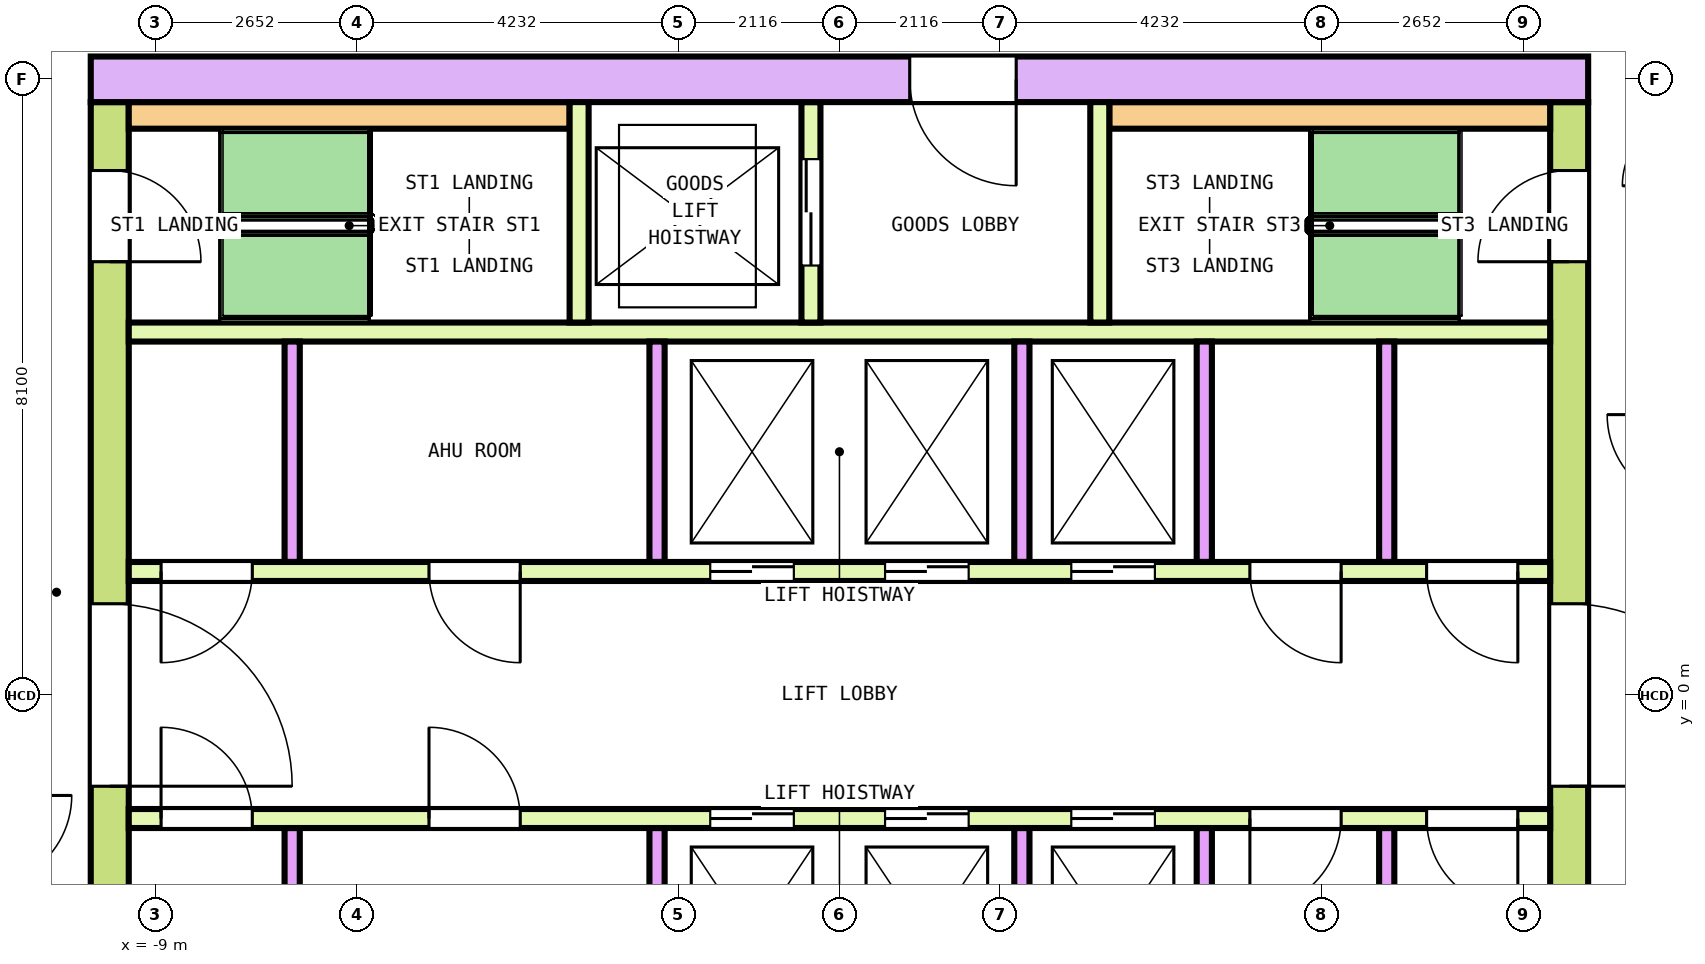
"""IFC4 building model, lengths in metres.
Left out: names, types, materials, properties, quantities, classifications, styles, units other than length and angle.
Written with IfcOpenShell. Run it as: python <this file> out.ifc"""

import sys

from ifc_helpers import new_model, si_unit, direction, frame, frame_2d, origin, place, context, subcontext, project, spatial, rectangle, extrude, element, fill, save


model = new_model("IFC4")
c1 = context("Model", 3, precision=1e-05, world=origin(), true_north=direction((0.0, 1.0)))
c2 = subcontext(c1, "Body", "Model", "MODEL_VIEW")
j1 = project(units=[si_unit("LENGTHUNIT", "METRE"), si_unit("PLANEANGLEUNIT", "RADIAN")], contexts=[c1])
p1 = place(None, origin())
s1 = spatial("IfcSite", under=j1, at=p1, CompositionType="ELEMENT")
p2 = place(p1, origin())
s2 = spatial("IfcBuilding", under=s1, at=p2, CompositionType="ELEMENT")
p3 = place(p2, frame((0.0, 0.0, 257.4)))
s3 = spatial("IfcBuildingStorey", under=s2, at=p3, CompositionType="ELEMENT", Elevation=257.4)
p4 = place(p3, frame((-9.85, 8.1, 0.0), z_axis=(0.0, 0.0, 1.0), x_axis=(1.0, 0.0, 0.0)))
e1 = element("IfcWall", 1, at=p4, inside=s3, PredefinedType="SHEAR", context=c2, shape_type="SweptSolid", body=[
    extrude(rectangle(XDim=19.7, YDim=0.6, at=frame_2d((9.85, 0.0))), origin(), (0.0, 0.0, 1.0), 5.3),
])
p5 = place(p4, frame((10.775, 0.0, 0.0)))
e2 = element("IfcOpeningElement", 2, at=p5, cuts=e1, PredefinedType="OPENING", context=c2, shape_type="SweptSolid", body=[
    extrude(rectangle(XDim=1.4, YDim=2.1, at=frame_2d((0.7, 1.05))), frame((0.0, 0.31, 0.0), z_axis=(0.0, -1.0, 0.0), x_axis=(1.0, 0.0, 0.0)), (0.0, 0.0, 1.0), 0.62),
])
p6 = place(p3, frame((-9.6, -7.8, 0.0), z_axis=(0.0, 0.0, 1.0), x_axis=(0.0, 1.0, 0.0)))
e3 = element("IfcWall", 3, at=p6, inside=s3, PredefinedType="SHEAR", context=c2, shape_type="SweptSolid", body=[
    extrude(rectangle(XDim=15.6, YDim=0.5, at=frame_2d((7.8, 0.0))), origin(), (0.0, 0.0, 1.0), 5.3),
])
p7 = place(p6, frame((6.6, 0.0, 0.0)))
e4 = element("IfcOpeningElement", 4, at=p7, cuts=e3, PredefinedType="OPENING", context=c2, shape_type="SweptSolid", body=[
    extrude(rectangle(XDim=2.4, YDim=2.1, at=frame_2d((1.2, 1.05))), frame((0.0, 0.26, 0.0), z_axis=(0.0, -1.0, 0.0), x_axis=(1.0, 0.0, 0.0)), (0.0, 0.0, 1.0), 0.52),
])
p8 = place(p6, frame((13.5, 0.0, 0.0)))
e5 = element("IfcOpeningElement", 5, at=p8, cuts=e3, PredefinedType="OPENING", context=c2, shape_type="SweptSolid", body=[
    extrude(rectangle(XDim=1.2, YDim=2.1, at=frame_2d((0.6, 1.05))), frame((0.0, 0.26, 0.0), z_axis=(0.0, -1.0, 0.0), x_axis=(1.0, 0.0, 0.0)), (0.0, 0.0, 1.0), 0.52),
])
p9 = place(p6, frame((0.9, 0.0, 0.0)))
e6 = element("IfcOpeningElement", 6, at=p9, cuts=e3, PredefinedType="OPENING", context=c2, shape_type="SweptSolid", body=[
    extrude(rectangle(XDim=1.2, YDim=2.1, at=frame_2d((0.6, 1.05))), frame((0.0, 0.26, 0.0), z_axis=(0.0, -1.0, 0.0), x_axis=(1.0, 0.0, 0.0)), (0.0, 0.0, 1.0), 0.52),
])
p10 = place(p3, frame((9.6, -7.8, 0.0), z_axis=(0.0, 0.0, 1.0), x_axis=(0.0, 1.0, 0.0)))
e7 = element("IfcWall", 7, at=p10, inside=s3, PredefinedType="SHEAR", context=c2, shape_type="SweptSolid", body=[
    extrude(rectangle(XDim=15.6, YDim=0.5, at=frame_2d((7.8, 0.0))), origin(), (0.0, 0.0, 1.0), 5.3),
])
p11 = place(p10, frame((6.6, 0.0, 0.0)))
e8 = element("IfcOpeningElement", 8, at=p11, cuts=e7, PredefinedType="OPENING", context=c2, shape_type="SweptSolid", body=[
    extrude(rectangle(XDim=2.4, YDim=2.1, at=frame_2d((1.2, 1.05))), frame((0.0, 0.26, 0.0), z_axis=(0.0, -1.0, 0.0), x_axis=(1.0, 0.0, 0.0)), (0.0, 0.0, 1.0), 0.52),
])
p12 = place(p10, frame((13.5, 0.0, 0.0)))
e9 = element("IfcOpeningElement", 9, at=p12, cuts=e7, PredefinedType="OPENING", context=c2, shape_type="SweptSolid", body=[
    extrude(rectangle(XDim=1.2, YDim=2.1, at=frame_2d((0.6, 1.05))), frame((0.0, 0.26, 0.0), z_axis=(0.0, -1.0, 0.0), x_axis=(1.0, 0.0, 0.0)), (0.0, 0.0, 1.0), 0.52),
])
p13 = place(p10, frame((1.0, 0.0, 0.0)))
e10 = element("IfcOpeningElement", 10, at=p13, cuts=e7, PredefinedType="OPENING", context=c2, shape_type="SweptSolid", body=[
    extrude(rectangle(XDim=1.0, YDim=2.1, at=frame_2d((0.5, 1.05))), frame((0.0, 0.26, 0.0), z_axis=(0.0, -1.0, 0.0), x_axis=(1.0, 0.0, 0.0)), (0.0, 0.0, 1.0), 0.52),
])
p14 = place(p3, frame((-9.35, 1.625, 0.0), z_axis=(0.0, 0.0, 1.0), x_axis=(1.0, 0.0, 0.0)))
e11 = element("IfcWall", 11, at=p14, inside=s3, PredefinedType="SOLIDWALL", context=c2, shape_type="SweptSolid", body=[
    extrude(rectangle(XDim=18.7, YDim=0.25, at=frame_2d((9.35, 0.0))), origin(), (0.0, 0.0, 1.0), 5.3),
])
p15 = place(p14, frame((7.65, 0.0, 0.0)))
e12 = element("IfcOpeningElement", 12, at=p15, cuts=e11, PredefinedType="OPENING", context=c2, shape_type="SweptSolid", body=[
    extrude(rectangle(XDim=1.1, YDim=2.1, at=frame_2d((0.55, 1.05))), frame((0.0, 0.135, 0.0), z_axis=(0.0, -1.0, 0.0), x_axis=(1.0, 0.0, 0.0)), (0.0, 0.0, 1.0), 0.27),
])
p16 = place(p14, frame((9.95, 0.0, 0.0)))
e13 = element("IfcOpeningElement", 13, at=p16, cuts=e11, PredefinedType="OPENING", context=c2, shape_type="SweptSolid", body=[
    extrude(rectangle(XDim=1.1, YDim=2.1, at=frame_2d((0.55, 1.05))), frame((0.0, 0.135, 0.0), z_axis=(0.0, -1.0, 0.0), x_axis=(1.0, 0.0, 0.0)), (0.0, 0.0, 1.0), 0.27),
])
p17 = place(p14, frame((12.4, 0.0, 0.0)))
e14 = element("IfcOpeningElement", 14, at=p17, cuts=e11, PredefinedType="OPENING", context=c2, shape_type="SweptSolid", body=[
    extrude(rectangle(XDim=1.1, YDim=2.1, at=frame_2d((0.55, 1.05))), frame((0.0, 0.135, 0.0), z_axis=(0.0, -1.0, 0.0), x_axis=(1.0, 0.0, 0.0)), (0.0, 0.0, 1.0), 0.27),
])
p18 = place(p14, frame((0.425, 0.0, 0.0)))
e15 = element("IfcOpeningElement", 15, at=p18, cuts=e11, PredefinedType="OPENING", context=c2, shape_type="SweptSolid", body=[
    extrude(rectangle(XDim=1.2, YDim=2.1, at=frame_2d((0.6, 1.05))), frame((0.0, 0.135, 0.0), z_axis=(0.0, -1.0, 0.0), x_axis=(1.0, 0.0, 0.0)), (0.0, 0.0, 1.0), 0.27),
])
p19 = place(p14, frame((3.95, 0.0, 0.0)))
e16 = element("IfcOpeningElement", 16, at=p19, cuts=e11, PredefinedType="OPENING", context=c2, shape_type="SweptSolid", body=[
    extrude(rectangle(XDim=1.2, YDim=2.1, at=frame_2d((0.6, 1.05))), frame((0.0, 0.135, 0.0), z_axis=(0.0, -1.0, 0.0), x_axis=(1.0, 0.0, 0.0)), (0.0, 0.0, 1.0), 0.27),
])
p20 = place(p14, frame((14.75, 0.0, 0.0)))
e17 = element("IfcOpeningElement", 17, at=p20, cuts=e11, PredefinedType="OPENING", context=c2, shape_type="SweptSolid", body=[
    extrude(rectangle(XDim=1.2, YDim=2.1, at=frame_2d((0.6, 1.05))), frame((0.0, 0.135, 0.0), z_axis=(0.0, -1.0, 0.0), x_axis=(1.0, 0.0, 0.0)), (0.0, 0.0, 1.0), 0.27),
])
p21 = place(p14, frame((17.075, 0.0, 0.0)))
e18 = element("IfcOpeningElement", 18, at=p21, cuts=e11, PredefinedType="OPENING", context=c2, shape_type="SweptSolid", body=[
    extrude(rectangle(XDim=1.2, YDim=2.1, at=frame_2d((0.6, 1.05))), frame((0.0, 0.135, 0.0), z_axis=(0.0, -1.0, 0.0), x_axis=(1.0, 0.0, 0.0)), (0.0, 0.0, 1.0), 0.27),
])
p22 = place(p3, frame((-9.35, 4.775, 0.0), z_axis=(0.0, 0.0, 1.0), x_axis=(1.0, 0.0, 0.0)))
e19 = element("IfcWall", 19, at=p22, inside=s3, PredefinedType="SOLIDWALL", context=c2, shape_type="SweptSolid", body=[
    extrude(rectangle(XDim=18.7, YDim=0.25, at=frame_2d((9.35, 0.0))), origin(), (0.0, 0.0, 1.0), 5.3),
])
for number, where, z_axis, x_axis in (
    (20, (-7.2, 1.75, 0.0), (0.0, 0.0, 1.0), (0.0, 1.0, 0.0)),
    (21, (-2.4, 1.75, 0.0), (0.0, 0.0, 1.0), (0.0, 1.0, 0.0)),
    (22, (2.4, 1.75, 0.0), (0.0, 0.0, 1.0), (0.0, 1.0, 0.0)),
    (23, (4.8, 1.75, 0.0), (0.0, 0.0, 1.0), (0.0, 1.0, 0.0)),
    (24, (7.2, 1.75, 0.0), (0.0, 0.0, 1.0), (0.0, 1.0, 0.0)),
):
    element("IfcWall", number, at=place(p3, frame(where, z_axis=z_axis, x_axis=x_axis)), inside=s3, PredefinedType="SOLIDWALL", context=c2, shape_type="SweptSolid", body=[
        extrude(rectangle(XDim=2.9, YDim=0.2, at=frame_2d((1.45, 0.0))), origin(), (0.0, 0.0, 1.0), 5.3),
    ])
p23 = place(p3, frame((-9.35, -1.625, 0.0), z_axis=(0.0, 0.0, 1.0), x_axis=(1.0, 0.0, 0.0)))
e25 = element("IfcWall", 25, at=p23, inside=s3, PredefinedType="SOLIDWALL", context=c2, shape_type="SweptSolid", body=[
    extrude(rectangle(XDim=18.7, YDim=0.25, at=frame_2d((9.35, 0.0))), origin(), (0.0, 0.0, 1.0), 5.3),
])
p24 = place(p23, frame((7.65, 0.0, 0.0)))
e26 = element("IfcOpeningElement", 26, at=p24, cuts=e25, PredefinedType="OPENING", context=c2, shape_type="SweptSolid", body=[
    extrude(rectangle(XDim=1.1, YDim=2.1, at=frame_2d((0.55, 1.05))), frame((0.0, 0.135, 0.0), z_axis=(0.0, -1.0, 0.0), x_axis=(1.0, 0.0, 0.0)), (0.0, 0.0, 1.0), 0.27),
])
p25 = place(p23, frame((9.95, 0.0, 0.0)))
e27 = element("IfcOpeningElement", 27, at=p25, cuts=e25, PredefinedType="OPENING", context=c2, shape_type="SweptSolid", body=[
    extrude(rectangle(XDim=1.1, YDim=2.1, at=frame_2d((0.55, 1.05))), frame((0.0, 0.135, 0.0), z_axis=(0.0, -1.0, 0.0), x_axis=(1.0, 0.0, 0.0)), (0.0, 0.0, 1.0), 0.27),
])
p26 = place(p23, frame((12.4, 0.0, 0.0)))
e28 = element("IfcOpeningElement", 28, at=p26, cuts=e25, PredefinedType="OPENING", context=c2, shape_type="SweptSolid", body=[
    extrude(rectangle(XDim=1.1, YDim=2.1, at=frame_2d((0.55, 1.05))), frame((0.0, 0.135, 0.0), z_axis=(0.0, -1.0, 0.0), x_axis=(1.0, 0.0, 0.0)), (0.0, 0.0, 1.0), 0.27),
])
p27 = place(p23, frame((0.425, 0.0, 0.0)))
e29 = element("IfcOpeningElement", 29, at=p27, cuts=e25, PredefinedType="OPENING", context=c2, shape_type="SweptSolid", body=[
    extrude(rectangle(XDim=1.2, YDim=2.1, at=frame_2d((0.6, 1.05))), frame((0.0, 0.135, 0.0), z_axis=(0.0, -1.0, 0.0), x_axis=(1.0, 0.0, 0.0)), (0.0, 0.0, 1.0), 0.27),
])
p28 = place(p23, frame((3.95, 0.0, 0.0)))
e30 = element("IfcOpeningElement", 30, at=p28, cuts=e25, PredefinedType="OPENING", context=c2, shape_type="SweptSolid", body=[
    extrude(rectangle(XDim=1.2, YDim=2.1, at=frame_2d((0.6, 1.05))), frame((0.0, 0.135, 0.0), z_axis=(0.0, -1.0, 0.0), x_axis=(1.0, 0.0, 0.0)), (0.0, 0.0, 1.0), 0.27),
])
p29 = place(p23, frame((14.75, 0.0, 0.0)))
e31 = element("IfcOpeningElement", 31, at=p29, cuts=e25, PredefinedType="OPENING", context=c2, shape_type="SweptSolid", body=[
    extrude(rectangle(XDim=1.2, YDim=2.1, at=frame_2d((0.6, 1.05))), frame((0.0, 0.135, 0.0), z_axis=(0.0, -1.0, 0.0), x_axis=(1.0, 0.0, 0.0)), (0.0, 0.0, 1.0), 0.27),
])
p30 = place(p23, frame((17.075, 0.0, 0.0)))
e32 = element("IfcOpeningElement", 32, at=p30, cuts=e25, PredefinedType="OPENING", context=c2, shape_type="SweptSolid", body=[
    extrude(rectangle(XDim=1.2, YDim=2.1, at=frame_2d((0.6, 1.05))), frame((0.0, 0.135, 0.0), z_axis=(0.0, -1.0, 0.0), x_axis=(1.0, 0.0, 0.0)), (0.0, 0.0, 1.0), 0.27),
])
for number, where, z_axis, x_axis in (
    (33, (-7.2, -4.65, 0.0), (0.0, 0.0, 1.0), (0.0, 1.0, 0.0)),
    (34, (-2.4, -4.65, 0.0), (0.0, 0.0, 1.0), (0.0, 1.0, 0.0)),
    (35, (2.4, -4.65, 0.0), (0.0, 0.0, 1.0), (0.0, 1.0, 0.0)),
    (36, (4.8, -4.65, 0.0), (0.0, 0.0, 1.0), (0.0, 1.0, 0.0)),
    (37, (7.2, -4.65, 0.0), (0.0, 0.0, 1.0), (0.0, 1.0, 0.0)),
):
    element("IfcWall", number, at=place(p3, frame(where, z_axis=z_axis, x_axis=x_axis)), inside=s3, PredefinedType="SOLIDWALL", context=c2, shape_type="SweptSolid", body=[
        extrude(rectangle(XDim=2.9, YDim=0.2, at=frame_2d((1.45, 0.0))), origin(), (0.0, 0.0, 1.0), 5.3),
    ])
for number, where, z_axis, x_axis in (
    (38, (-9.35, 7.625, 0.0), (0.0, 0.0, 1.0), (1.0, 0.0, 0.0)),
    (39, (3.55, 7.625, 0.0), (0.0, 0.0, 1.0), (1.0, 0.0, 0.0)),
):
    element("IfcWall", number, at=place(p3, frame(where, z_axis=z_axis, x_axis=x_axis)), inside=s3, PredefinedType="SOLIDWALL", context=c2, shape_type="SweptSolid", body=[
        extrude(rectangle(XDim=5.8, YDim=0.35, at=frame_2d((2.9, 0.0))), origin(), (0.0, 0.0, 1.0), 5.3),
    ])
p31 = place(p3, frame((-3.425, 4.9, 0.0), z_axis=(0.0, 0.0, 1.0), x_axis=(0.0, 1.0, 0.0)))
e40 = element("IfcWall", 40, at=p31, inside=s3, PredefinedType="SOLIDWALL", context=c2, shape_type="SweptSolid", body=[
    extrude(rectangle(XDim=2.9, YDim=0.25, at=frame_2d((1.45, 0.0))), origin(), (0.0, 0.0, 1.0), 5.3),
])
p32 = place(p3, frame((-0.375, 4.9, 0.0), z_axis=(0.0, 0.0, 1.0), x_axis=(0.0, 1.0, 0.0)))
e41 = element("IfcWall", 41, at=p32, inside=s3, PredefinedType="SOLIDWALL", context=c2, shape_type="SweptSolid", body=[
    extrude(rectangle(XDim=2.9, YDim=0.25, at=frame_2d((1.45, 0.0))), origin(), (0.0, 0.0, 1.0), 5.3),
])
p33 = place(p32, frame((0.75, 0.0, 0.0)))
e42 = element("IfcOpeningElement", 42, at=p33, cuts=e41, PredefinedType="OPENING", context=c2, shape_type="SweptSolid", body=[
    extrude(rectangle(XDim=1.4, YDim=2.1, at=frame_2d((0.7, 1.05))), frame((0.0, 0.135, 0.0), z_axis=(0.0, -1.0, 0.0), x_axis=(1.0, 0.0, 0.0)), (0.0, 0.0, 1.0), 0.27),
])
p34 = place(p3, frame((3.425, 4.9, 0.0), z_axis=(0.0, 0.0, 1.0), x_axis=(0.0, 1.0, 0.0)))
e43 = element("IfcWall", 43, at=p34, inside=s3, PredefinedType="SOLIDWALL", context=c2, shape_type="SweptSolid", body=[
    extrude(rectangle(XDim=2.9, YDim=0.25, at=frame_2d((1.45, 0.0))), origin(), (0.0, 0.0, 1.0), 5.3),
])
p35 = place(p15, origin())
e44 = element("IfcDoor", 44, at=p35, inside=s3, OperationType="DOUBLE_DOOR_SLIDING", PredefinedType="DOOR", context=c2, shape_type="SweptSolid", body=[
    extrude(rectangle(XDim=1.1, YDim=2.1, at=frame_2d((0.55, 1.05))), frame((0.0, 0.075, 0.0), z_axis=(0.0, -1.0, 0.0), x_axis=(1.0, 0.0, 0.0)), (0.0, 0.0, 1.0), 0.15),
])
fill(e12, e44)
p36 = place(p16, origin())
e45 = element("IfcDoor", 45, at=p36, inside=s3, OperationType="DOUBLE_DOOR_SLIDING", PredefinedType="DOOR", context=c2, shape_type="SweptSolid", body=[
    extrude(rectangle(XDim=1.1, YDim=2.1, at=frame_2d((0.55, 1.05))), frame((0.0, 0.075, 0.0), z_axis=(0.0, -1.0, 0.0), x_axis=(1.0, 0.0, 0.0)), (0.0, 0.0, 1.0), 0.15),
])
fill(e13, e45)
p37 = place(p17, origin())
e46 = element("IfcDoor", 46, at=p37, inside=s3, OperationType="DOUBLE_DOOR_SLIDING", PredefinedType="DOOR", context=c2, shape_type="SweptSolid", body=[
    extrude(rectangle(XDim=1.1, YDim=2.1, at=frame_2d((0.55, 1.05))), frame((0.0, 0.075, 0.0), z_axis=(0.0, -1.0, 0.0), x_axis=(1.0, 0.0, 0.0)), (0.0, 0.0, 1.0), 0.15),
])
fill(e14, e46)
p38 = place(p24, origin())
e47 = element("IfcDoor", 47, at=p38, inside=s3, OperationType="DOUBLE_DOOR_SLIDING", PredefinedType="DOOR", context=c2, shape_type="SweptSolid", body=[
    extrude(rectangle(XDim=1.1, YDim=2.1, at=frame_2d((0.55, 1.05))), frame((0.0, 0.075, 0.0), z_axis=(0.0, -1.0, 0.0), x_axis=(1.0, 0.0, 0.0)), (0.0, 0.0, 1.0), 0.15),
])
fill(e26, e47)
p39 = place(p25, origin())
e48 = element("IfcDoor", 48, at=p39, inside=s3, OperationType="DOUBLE_DOOR_SLIDING", PredefinedType="DOOR", context=c2, shape_type="SweptSolid", body=[
    extrude(rectangle(XDim=1.1, YDim=2.1, at=frame_2d((0.55, 1.05))), frame((0.0, 0.075, 0.0), z_axis=(0.0, -1.0, 0.0), x_axis=(1.0, 0.0, 0.0)), (0.0, 0.0, 1.0), 0.15),
])
fill(e27, e48)
p40 = place(p26, origin())
e49 = element("IfcDoor", 49, at=p40, inside=s3, OperationType="DOUBLE_DOOR_SLIDING", PredefinedType="DOOR", context=c2, shape_type="SweptSolid", body=[
    extrude(rectangle(XDim=1.1, YDim=2.1, at=frame_2d((0.55, 1.05))), frame((0.0, 0.075, 0.0), z_axis=(0.0, -1.0, 0.0), x_axis=(1.0, 0.0, 0.0)), (0.0, 0.0, 1.0), 0.15),
])
fill(e28, e49)
p41 = place(p33, origin())
e50 = element("IfcDoor", 50, at=p41, inside=s3, OperationType="DOUBLE_DOOR_SLIDING", PredefinedType="DOOR", context=c2, shape_type="SweptSolid", body=[
    extrude(rectangle(XDim=1.4, YDim=2.1, at=frame_2d((0.7, 1.05))), frame((0.0, 0.075, 0.0), z_axis=(0.0, -1.0, 0.0), x_axis=(1.0, 0.0, 0.0)), (0.0, 0.0, 1.0), 0.15),
])
fill(e42, e50)
p42 = place(p7, origin())
e51 = element("IfcDoor", 51, at=p42, inside=s3, OperationType="DOUBLE_DOOR_SINGLE_SWING", PredefinedType="DOOR", context=c2, shape_type="SweptSolid", body=[
    extrude(rectangle(XDim=2.4, YDim=2.1, at=frame_2d((1.2, 1.05))), frame((0.0, 0.2, 0.0), z_axis=(0.0, -1.0, 0.0), x_axis=(1.0, 0.0, 0.0)), (0.0, 0.0, 1.0), 0.4),
])
fill(e4, e51)
p43 = place(p11, origin())
e52 = element("IfcDoor", 52, at=p43, inside=s3, OperationType="DOUBLE_DOOR_SINGLE_SWING", PredefinedType="DOOR", context=c2, shape_type="SweptSolid", body=[
    extrude(rectangle(XDim=2.4, YDim=2.1, at=frame_2d((1.2, 1.05))), frame((0.0, 0.2, 0.0), z_axis=(0.0, -1.0, 0.0), x_axis=(1.0, 0.0, 0.0)), (0.0, 0.0, 1.0), 0.4),
])
fill(e8, e52)
p44 = place(p8, origin())
e53 = element("IfcDoor", 53, at=p44, inside=s3, OperationType="SINGLE_SWING_RIGHT", PredefinedType="DOOR", context=c2, shape_type="SweptSolid", body=[
    extrude(rectangle(XDim=1.2, YDim=2.1, at=frame_2d((0.6, 1.05))), frame((0.0, 0.2, 0.0), z_axis=(0.0, -1.0, 0.0), x_axis=(1.0, 0.0, 0.0)), (0.0, 0.0, 1.0), 0.4),
])
fill(e5, e53)
p45 = place(p12, origin())
e54 = element("IfcDoor", 54, at=p45, inside=s3, OperationType="SINGLE_SWING_RIGHT", PredefinedType="DOOR", context=c2, shape_type="SweptSolid", body=[
    extrude(rectangle(XDim=1.2, YDim=2.1, at=frame_2d((0.6, 1.05))), frame((0.0, 0.2, 0.0), z_axis=(0.0, -1.0, 0.0), x_axis=(1.0, 0.0, 0.0)), (0.0, 0.0, 1.0), 0.4),
])
fill(e9, e54)
p46 = place(p5, origin())
e55 = element("IfcDoor", 55, at=p46, inside=s3, OperationType="DOUBLE_DOOR_SINGLE_SWING", PredefinedType="DOOR", context=c2, shape_type="SweptSolid", body=[
    extrude(rectangle(XDim=1.4, YDim=2.1, at=frame_2d((0.7, 1.05))), frame((0.0, 0.25, 0.0), z_axis=(0.0, -1.0, 0.0), x_axis=(1.0, 0.0, 0.0)), (0.0, 0.0, 1.0), 0.5),
])
fill(e2, e55)
p47 = place(p18, origin())
e56 = element("IfcDoor", 56, at=p47, inside=s3, OperationType="SINGLE_SWING_RIGHT", PredefinedType="DOOR", context=c2, shape_type="SweptSolid", body=[
    extrude(rectangle(XDim=1.2, YDim=2.1, at=frame_2d((0.6, 1.05))), frame((0.0, 0.075, 0.0), z_axis=(0.0, -1.0, 0.0), x_axis=(1.0, 0.0, 0.0)), (0.0, 0.0, 1.0), 0.15),
])
fill(e15, e56)
p48 = place(p19, origin())
e57 = element("IfcDoor", 57, at=p48, inside=s3, OperationType="SINGLE_SWING_LEFT", PredefinedType="DOOR", context=c2, shape_type="SweptSolid", body=[
    extrude(rectangle(XDim=1.2, YDim=2.1, at=frame_2d((0.6, 1.05))), frame((0.0, 0.075, 0.0), z_axis=(0.0, -1.0, 0.0), x_axis=(1.0, 0.0, 0.0)), (0.0, 0.0, 1.0), 0.15),
])
fill(e16, e57)
p49 = place(p20, origin())
e58 = element("IfcDoor", 58, at=p49, inside=s3, OperationType="SINGLE_SWING_RIGHT", PredefinedType="DOOR", context=c2, shape_type="SweptSolid", body=[
    extrude(rectangle(XDim=1.2, YDim=2.1, at=frame_2d((0.6, 1.05))), frame((0.0, 0.075, 0.0), z_axis=(0.0, -1.0, 0.0), x_axis=(1.0, 0.0, 0.0)), (0.0, 0.0, 1.0), 0.15),
])
fill(e17, e58)
p50 = place(p21, origin())
e59 = element("IfcDoor", 59, at=p50, inside=s3, OperationType="SINGLE_SWING_LEFT", PredefinedType="DOOR", context=c2, shape_type="SweptSolid", body=[
    extrude(rectangle(XDim=1.2, YDim=2.1, at=frame_2d((0.6, 1.05))), frame((0.0, 0.075, 0.0), z_axis=(0.0, -1.0, 0.0), x_axis=(1.0, 0.0, 0.0)), (0.0, 0.0, 1.0), 0.15),
])
fill(e18, e59)
p51 = place(p27, origin())
e60 = element("IfcDoor", 60, at=p51, inside=s3, OperationType="SINGLE_SWING_RIGHT", PredefinedType="DOOR", context=c2, shape_type="SweptSolid", body=[
    extrude(rectangle(XDim=1.2, YDim=2.1, at=frame_2d((0.6, 1.05))), frame((0.0, 0.075, 0.0), z_axis=(0.0, -1.0, 0.0), x_axis=(1.0, 0.0, 0.0)), (0.0, 0.0, 1.0), 0.15),
])
fill(e29, e60)
p52 = place(p28, origin())
e61 = element("IfcDoor", 61, at=p52, inside=s3, OperationType="SINGLE_SWING_LEFT", PredefinedType="DOOR", context=c2, shape_type="SweptSolid", body=[
    extrude(rectangle(XDim=1.2, YDim=2.1, at=frame_2d((0.6, 1.05))), frame((0.0, 0.075, 0.0), z_axis=(0.0, -1.0, 0.0), x_axis=(1.0, 0.0, 0.0)), (0.0, 0.0, 1.0), 0.15),
])
fill(e30, e61)
p53 = place(p29, origin())
e62 = element("IfcDoor", 62, at=p53, inside=s3, OperationType="SINGLE_SWING_RIGHT", PredefinedType="DOOR", context=c2, shape_type="SweptSolid", body=[
    extrude(rectangle(XDim=1.2, YDim=2.1, at=frame_2d((0.6, 1.05))), frame((0.0, 0.075, 0.0), z_axis=(0.0, -1.0, 0.0), x_axis=(1.0, 0.0, 0.0)), (0.0, 0.0, 1.0), 0.15),
])
fill(e31, e62)
p54 = place(p30, origin())
e63 = element("IfcDoor", 63, at=p54, inside=s3, OperationType="SINGLE_SWING_LEFT", PredefinedType="DOOR", context=c2, shape_type="SweptSolid", body=[
    extrude(rectangle(XDim=1.2, YDim=2.1, at=frame_2d((0.6, 1.05))), frame((0.0, 0.075, 0.0), z_axis=(0.0, -1.0, 0.0), x_axis=(1.0, 0.0, 0.0)), (0.0, 0.0, 1.0), 0.15),
])
fill(e32, e63)
save(model, sys.argv[1])
